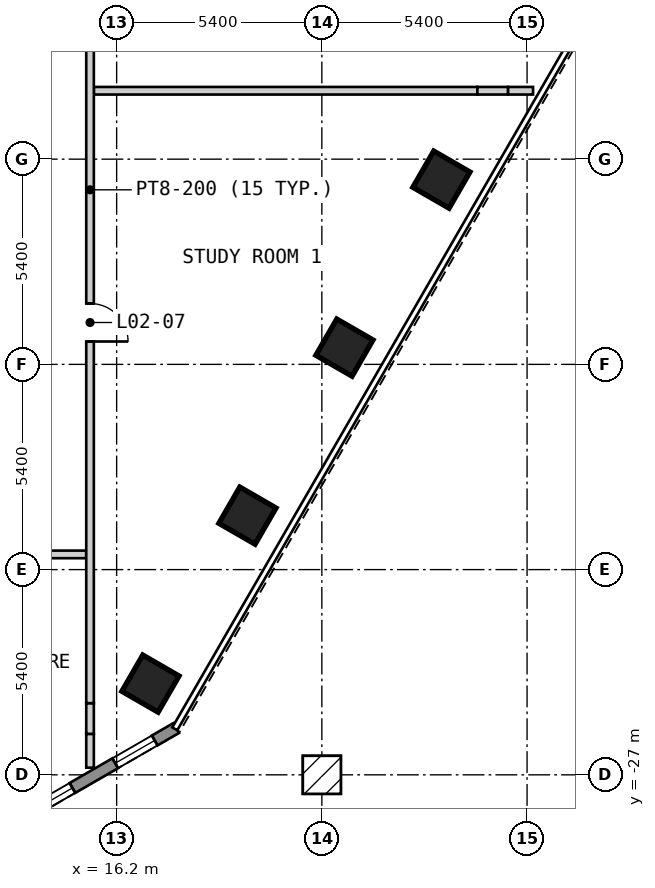
"""IFC4 building model, lengths in metres.
Left out: names, types, materials, properties, quantities, classifications, styles, units other than length and angle.
Written with IfcOpenShell. Run it as: python <this file> out.ifc"""

import sys

from ifc_helpers import new_model, si_unit, direction, frame, frame_2d, origin, origin_2d, place, context, subcontext, project, spatial, polyline, rectangle, outline, extrude, element, fill, save


model = new_model("IFC4")
c1 = context("Model", 3, precision=1e-05, world=origin(), true_north=direction((0.0, 1.0)))
c2 = subcontext(c1, "Body", "Model", "MODEL_VIEW")
j1 = project(units=[si_unit("LENGTHUNIT", "METRE"), si_unit("PLANEANGLEUNIT", "RADIAN")], contexts=[c1])
p1 = place(None, origin())
s1 = spatial("IfcSite", under=j1, at=p1, CompositionType="ELEMENT")
p2 = place(p1, origin())
s2 = spatial("IfcBuilding", under=s1, at=p2, CompositionType="ELEMENT")
p3 = place(p2, frame((0.0, 0.0, 9.0)))
s3 = spatial("IfcBuildingStorey", under=s2, at=p3, CompositionType="ELEMENT", Elevation=9.0)
for number, where, z_axis, x_axis in (
    (1, (17.09, -24.6, 0.0), (0.0, 0.0, 1.0), (0.5, 0.866, 0.0)),
    (2, (19.642, -20.18, 0.0), (0.0, 0.0, 1.0), (0.5, 0.866, 0.0)),
    (3, (22.194, -15.759, 0.0), (0.0, 0.0, 1.0), (0.5, 0.866, 0.0)),
    (4, (24.746, -11.339, 0.0), (0.0, 0.0, 1.0), (0.5, 0.866, 0.0)),
):
    element("IfcColumn", number, at=place(p3, frame(where, z_axis=z_axis, x_axis=x_axis)), inside=s3, PredefinedType="COLUMN", context=c2, shape_type="SweptSolid", body=[
        extrude(rectangle(XDim=1.1, YDim=1.1, at=origin_2d()), origin(), (0.0, 0.0, 1.0), 3.6),
    ])
p4 = place(p3, frame((13.435, -28.27, 0.0), z_axis=(0.0, 0.0, 1.0), x_axis=(0.866010750942, 0.50002537861, 0.0)))
e5 = element("IfcWall", 5, at=p4, inside=s3, PredefinedType="SOLIDWALL", context=c2, shape_type="SweptSolid", body=[
    extrude(outline(polyline([(0.0, -0.15), (5.0, -0.15), (4.919, 0.15), (0.08, 0.15), (0.0, -0.15)])), origin(), (0.0, 0.0, 1.0), 3.25),
])
p5 = place(p4, frame((0.65, 0.0, 0.15)))
e6 = element("IfcOpeningElement", 6, at=p5, cuts=e5, PredefinedType="OPENING", context=c2, shape_type="SweptSolid", body=[
    extrude(rectangle(XDim=1.2, YDim=2.1, at=frame_2d((0.6, 1.05))), frame((0.0, 0.16, 0.0), z_axis=(0.0, -1.0, 0.0), x_axis=(1.0, 0.0, 0.0)), (0.0, 0.0, 1.0), 0.32),
])
p6 = place(p4, frame((3.149, 0.0, 0.15)))
e7 = element("IfcOpeningElement", 7, at=p6, cuts=e5, PredefinedType="OPENING", context=c2, shape_type="SweptSolid", body=[
    extrude(rectangle(XDim=1.2, YDim=2.1, at=frame_2d((0.6, 1.05))), frame((0.0, 0.16, 0.0), z_axis=(0.0, -1.0, 0.0), x_axis=(1.0, 0.0, 0.0)), (0.0, 0.0, 1.0), 0.32),
])
p7 = place(p3, frame((9.7, -21.2, 0.0), z_axis=(0.0, 0.0, 1.0), x_axis=(1.0, 0.0, 0.0)))
e8 = element("IfcWall", 8, at=p7, inside=s3, PredefinedType="PARTITIONING", context=c2, shape_type="SweptSolid", body=[
    extrude(rectangle(XDim=5.7, YDim=0.2, at=frame_2d((2.85, 0.0))), origin(), (0.0, 0.0, 1.0), 3.25),
])
p8 = place(p3, frame((15.6, -9.0, 0.0), z_axis=(0.0, 0.0, 1.0), x_axis=(1.0, 0.0, 0.0)))
e9 = element("IfcWall", 9, at=p8, inside=s3, PredefinedType="PARTITIONING", context=c2, shape_type="SweptSolid", body=[
    extrude(rectangle(XDim=10.092, YDim=0.2, at=frame_2d((5.046, 0.0))), origin(), (0.0, 0.0, 1.0), 3.25),
])
p9 = place(p3, frame((25.692, -9.0, 0.0), z_axis=(0.0, 0.0, 1.0), x_axis=(1.0, 0.0, 0.0)))
e10 = element("IfcWall", 10, at=p9, inside=s3, PredefinedType="PARTITIONING", context=c2, shape_type="SweptSolid", body=[
    extrude(rectangle(XDim=0.809, YDim=0.2, at=frame_2d((0.405, 0.0))), origin(), (0.0, 0.0, 1.0), 2.52),
])
p10 = place(p3, frame((26.501, -9.0, 0.0), z_axis=(0.0, 0.0, 1.0), x_axis=(1.0, 0.0, 0.0)))
e11 = element("IfcWall", 11, at=p10, inside=s3, PredefinedType="PARTITIONING", context=c2, shape_type="SweptSolid", body=[
    extrude(rectangle(XDim=0.657, YDim=0.2, at=frame_2d((0.329, 0.0))), origin(), (0.0, 0.0, 1.0), 3.25),
])
p11 = place(p3, frame((15.5, -26.812, 0.0), z_axis=(0.0, 0.0, 1.0), x_axis=(0.0, 1.0, 0.0)))
e12 = element("IfcWall", 12, at=p11, inside=s3, PredefinedType="PARTITIONING", context=c2, shape_type="SweptSolid", body=[
    extrude(rectangle(XDim=0.89, YDim=0.2, at=frame_2d((0.445, 0.0))), origin(), (0.0, 0.0, 1.0), 3.25),
])
p12 = place(p3, frame((15.5, -25.922, 0.0), z_axis=(0.0, 0.0, 1.0), x_axis=(0.0, 1.0, 0.0)))
e13 = element("IfcWall", 13, at=p12, inside=s3, PredefinedType="PARTITIONING", context=c2, shape_type="SweptSolid", body=[
    extrude(rectangle(XDim=0.808, YDim=0.2, at=frame_2d((0.404, 0.0))), origin(), (0.0, 0.0, 1.0), 2.52),
])
p13 = place(p3, frame((15.5, -25.114, 0.0), z_axis=(0.0, 0.0, 1.0), x_axis=(0.0, 1.0, 0.0)))
e14 = element("IfcWall", 14, at=p13, inside=s3, PredefinedType="PARTITIONING", context=c2, shape_type="SweptSolid", body=[
    extrude(rectangle(XDim=27.014, YDim=0.2, at=frame_2d((13.507, 0.0))), origin(), (0.0, 0.0, 1.0), 3.25),
])
p14 = place(p13, frame((10.516, 0.0, 0.0), z_axis=(0.0, 0.0, 1.0), x_axis=(-1.0, 0.0, 0.0)))
e15 = element("IfcOpeningElement", 15, at=p14, cuts=e14, PredefinedType="OPENING", context=c2, shape_type="SweptSolid", body=[
    extrude(rectangle(XDim=1.0, YDim=2.1, at=frame_2d((0.5, 1.05))), frame((0.0, 0.11, 0.0), z_axis=(0.0, -1.0, 0.0), x_axis=(1.0, 0.0, 0.0)), (0.0, 0.0, 1.0), 0.22),
])
p15 = place(p13, frame((22.112, 0.0, 0.0), z_axis=(0.0, 0.0, 1.0), x_axis=(-1.0, 0.0, 0.0)))
e16 = element("IfcOpeningElement", 16, at=p15, cuts=e14, PredefinedType="OPENING", context=c2, shape_type="SweptSolid", body=[
    extrude(rectangle(XDim=1.0, YDim=2.1, at=frame_2d((0.5, 1.05))), frame((0.0, 0.11, 0.0), z_axis=(0.0, -1.0, 0.0), x_axis=(1.0, 0.0, 0.0)), (0.0, 0.0, 1.0), 0.22),
])
p16 = place(p5, origin())
e17 = element("IfcWindow", 17, at=p16, inside=s3, PartitioningType="SINGLE_PANEL", PredefinedType="WINDOW", context=c2, shape_type="SweptSolid", body=[
    extrude(rectangle(XDim=1.2, YDim=2.1, at=frame_2d((0.6, 1.05))), frame((0.0, 0.03, 0.0), z_axis=(0.0, -1.0, 0.0), x_axis=(1.0, 0.0, 0.0)), (0.0, 0.0, 1.0), 0.06),
])
fill(e6, e17)
p17 = place(p6, origin())
e18 = element("IfcWindow", 18, at=p17, inside=s3, PartitioningType="SINGLE_PANEL", PredefinedType="WINDOW", context=c2, shape_type="SweptSolid", body=[
    extrude(rectangle(XDim=1.2, YDim=2.1, at=frame_2d((0.6, 1.05))), frame((0.0, 0.03, 0.0), z_axis=(0.0, -1.0, 0.0), x_axis=(1.0, 0.0, 0.0)), (0.0, 0.0, 1.0), 0.06),
])
fill(e7, e18)
p18 = place(p14, origin())
e19 = element("IfcDoor", 19, at=p18, inside=s3, OperationType="SINGLE_SWING_RIGHT", PredefinedType="DOOR", context=c2, shape_type="SweptSolid", body=[
    extrude(rectangle(XDim=1.0, YDim=2.1, at=frame_2d((0.5, 1.05))), frame((0.0, 0.025, 0.0), z_axis=(0.0, -1.0, 0.0), x_axis=(1.0, 0.0, 0.0)), (0.0, 0.0, 1.0), 0.05),
])
fill(e15, e19)
save(model, sys.argv[1])
